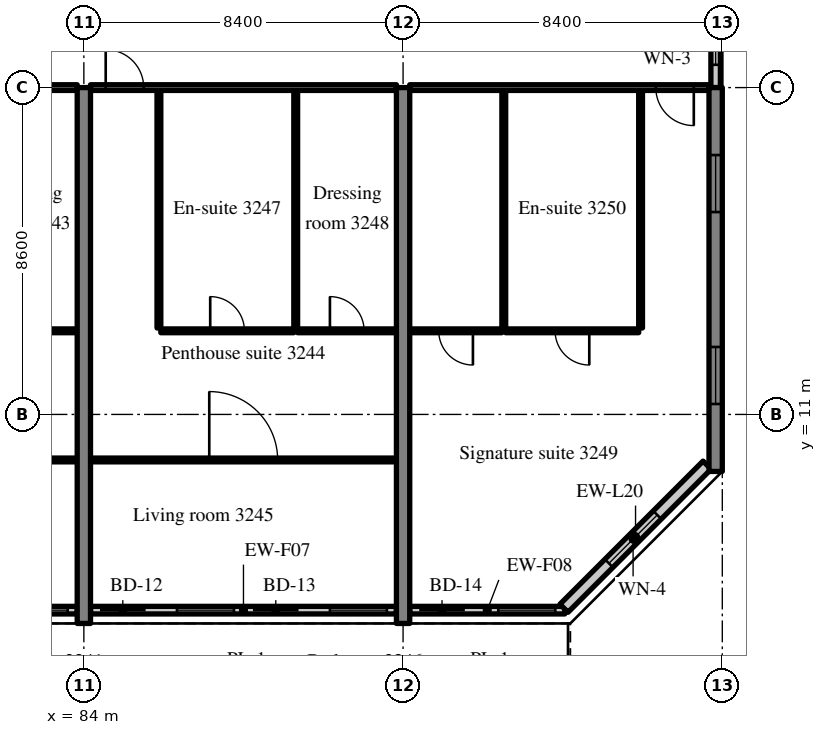
"""IFC4 building model, lengths in metres.
Left out: names, types, materials, properties, quantities, classifications, styles, units other than length and angle.
Written with IfcOpenShell. Run it as: python <this file> out.ifc"""

import sys

from ifc_helpers import new_model, si_unit, direction, frame, frame_2d, origin, place, context, subcontext, project, spatial, rectangle, extrude, source, transform, mapped, element, fill, save


model = new_model("IFC4")
c1 = context("Model", 3, precision=1e-05, world=origin(), true_north=direction((0.0, 1.0)))
c2 = subcontext(c1, "Body", "Model", "MODEL_VIEW")
j1 = project(units=[si_unit("LENGTHUNIT", "METRE"), si_unit("PLANEANGLEUNIT", "RADIAN")], contexts=[c1])
p1 = place(None, origin())
s1 = spatial("IfcSite", under=j1, at=p1, CompositionType="ELEMENT")
p2 = place(p1, origin())
s2 = spatial("IfcBuilding", under=s1, at=p2, CompositionType="ELEMENT")
p3 = place(p2, frame((0.0, 0.0, 133.2)))
s3 = spatial("IfcBuildingStorey", under=s2, at=p3, CompositionType="ELEMENT", Elevation=133.2)
m1 = source(origin(), c2, "Body", "SweptSolid", [
    extrude(rectangle(XDim=14.1, YDim=0.35, at=frame_2d((7.05, 0.0))), origin(), (0.0, 0.0, 1.0), 3.52),
])
for number, where, z_axis, x_axis in (
    (1, (84.0, 5.5, 0.0), (0.0, 0.0, 1.0), (0.0, 1.0, 0.0)),
    (2, (92.4, 5.5, 0.0), (0.0, 0.0, 1.0), (0.0, 1.0, 0.0)),
):
    element("IfcWall", number, at=place(p3, frame(where, z_axis=z_axis, x_axis=x_axis)), inside=s3, PredefinedType="SHEAR", context=c2, shape_type="MappedRepresentation", body=[
        mapped(m1, transform((0.0, 0.0, 0.0), scale=1.0)),
    ])
m2 = source(origin(), c2, "Body", "SweptSolid", [
    extrude(rectangle(XDim=10.1, YDim=0.35, at=frame_2d((5.05, 0.0))), origin(), (0.0, 0.0, 1.0), 3.52),
])
p4 = place(p3, frame((100.625, 9.5, 0.0), z_axis=(0.0, 0.0, 1.0), x_axis=(0.0, 1.0, 0.0)))
e3 = element("IfcWall", 3, at=p4, inside=s3, PredefinedType="SHEAR", context=c2, shape_type="MappedRepresentation", body=[
    mapped(m2, transform((0.0, 0.0, 0.0), scale=1.0)),
])
m3 = source(origin(), c2, "Body", "SweptSolid", [
    extrude(rectangle(XDim=1.5, YDim=1.5, at=frame_2d((0.75, 0.75))), frame((0.0, 0.185, 0.0), z_axis=(0.0, -1.0, 0.0), x_axis=(1.0, 0.0, 0.0)), (0.0, 0.0, 1.0), 0.37),
])
p5 = place(p4, frame((1.775, 0.0, 0.9)))
e4 = element("IfcOpeningElement", 4, at=p5, cuts=e3, PredefinedType="OPENING", context=c2, shape_type="MappedRepresentation", body=[
    mapped(m3, transform((0.0, 0.0, 0.0), scale=1.0)),
])
p6 = place(p4, frame((6.825, 0.0, 0.9)))
e5 = element("IfcOpeningElement", 5, at=p6, cuts=e3, PredefinedType="OPENING", context=c2, shape_type="MappedRepresentation", body=[
    mapped(m3, transform((0.0, 0.0, 0.0), scale=1.0)),
])
m4 = source(origin(), c2, "Body", "SweptSolid", [
    extrude(rectangle(XDim=8.05, YDim=0.2, at=frame_2d((4.025, 0.0))), origin(), (0.0, 0.0, 1.0), 2.82),
])
p7 = place(p3, frame((75.775, 5.85, 0.0), z_axis=(0.0, 0.0, 1.0), x_axis=(1.0, 0.0, 0.0)))
e6 = element("IfcWall", 6, at=p7, inside=s3, PredefinedType="SOLIDWALL", context=c2, shape_type="MappedRepresentation", body=[
    mapped(m4, transform((0.0, 0.0, 0.0), scale=1.0)),
])
m5 = source(origin(), c2, "Body", "SweptSolid", [
    extrude(rectangle(XDim=1.2, YDim=2.4, at=frame_2d((0.6, 1.2))), frame((0.0, 0.11, 0.0), z_axis=(0.0, -1.0, 0.0), x_axis=(1.0, 0.0, 0.0)), (0.0, 0.0, 1.0), 0.22),
])
p8 = place(p7, frame((0.25, 0.0, 0.0)))
e7 = element("IfcOpeningElement", 7, at=p8, cuts=e6, PredefinedType="OPENING", context=c2, shape_type="MappedRepresentation", body=[
    mapped(m5, transform((0.0, 0.0, 0.0), scale=1.0)),
])
m6 = source(origin(), c2, "Body", "SweptSolid", [
    extrude(rectangle(XDim=1.5, YDim=1.5, at=frame_2d((0.75, 0.75))), frame((0.0, 0.11, 0.0), z_axis=(0.0, -1.0, 0.0), x_axis=(1.0, 0.0, 0.0)), (0.0, 0.0, 1.0), 0.22),
])
p9 = place(p7, frame((2.275, 0.0, 0.9)))
e8 = element("IfcOpeningElement", 8, at=p9, cuts=e6, PredefinedType="OPENING", context=c2, shape_type="MappedRepresentation", body=[
    mapped(m6, transform((0.0, 0.0, 0.0), scale=1.0)),
])
p10 = place(p7, frame((4.275, 0.0, 0.0)))
e9 = element("IfcOpeningElement", 9, at=p10, cuts=e6, PredefinedType="OPENING", context=c2, shape_type="MappedRepresentation", body=[
    mapped(m5, transform((0.0, 0.0, 0.0), scale=1.0)),
])
p11 = place(p7, frame((6.3, 0.0, 0.9)))
e10 = element("IfcOpeningElement", 10, at=p11, cuts=e6, PredefinedType="OPENING", context=c2, shape_type="MappedRepresentation", body=[
    mapped(m6, transform((0.0, 0.0, 0.0), scale=1.0)),
])
p12 = place(p3, frame((84.175, 5.85, 0.0), z_axis=(0.0, 0.0, 1.0), x_axis=(1.0, 0.0, 0.0)))
e11 = element("IfcWall", 11, at=p12, inside=s3, PredefinedType="SOLIDWALL", context=c2, shape_type="MappedRepresentation", body=[
    mapped(m4, transform((0.0, 0.0, 0.0), scale=1.0)),
])
p13 = place(p12, frame((0.25, 0.0, 0.0)))
e12 = element("IfcOpeningElement", 12, at=p13, cuts=e11, PredefinedType="OPENING", context=c2, shape_type="MappedRepresentation", body=[
    mapped(m5, transform((0.0, 0.0, 0.0), scale=1.0)),
])
p14 = place(p12, frame((2.275, 0.0, 0.9)))
e13 = element("IfcOpeningElement", 13, at=p14, cuts=e11, PredefinedType="OPENING", context=c2, shape_type="MappedRepresentation", body=[
    mapped(m6, transform((0.0, 0.0, 0.0), scale=1.0)),
])
p15 = place(p12, frame((4.275, 0.0, 0.0)))
e14 = element("IfcOpeningElement", 14, at=p15, cuts=e11, PredefinedType="OPENING", context=c2, shape_type="MappedRepresentation", body=[
    mapped(m5, transform((0.0, 0.0, 0.0), scale=1.0)),
])
p16 = place(p12, frame((6.3, 0.0, 0.9)))
e15 = element("IfcOpeningElement", 15, at=p16, cuts=e11, PredefinedType="OPENING", context=c2, shape_type="MappedRepresentation", body=[
    mapped(m6, transform((0.0, 0.0, 0.0), scale=1.0)),
])
m7 = source(origin(), c2, "Body", "SweptSolid", [
    extrude(rectangle(XDim=4.08, YDim=0.2, at=frame_2d((2.04, 0.0))), origin(), (0.0, 0.0, 1.0), 2.82),
])
p17 = place(p3, frame((92.575, 5.85, 0.0), z_axis=(0.0, 0.0, 1.0), x_axis=(1.0, 0.0, 0.0)))
e16 = element("IfcWall", 16, at=p17, inside=s3, PredefinedType="SOLIDWALL", context=c2, shape_type="MappedRepresentation", body=[
    mapped(m7, transform((0.0, 0.0, 0.0), scale=1.0)),
])
p18 = place(p17, frame((0.25, 0.0, 0.0)))
e17 = element("IfcOpeningElement", 17, at=p18, cuts=e16, PredefinedType="OPENING", context=c2, shape_type="MappedRepresentation", body=[
    mapped(m5, transform((0.0, 0.0, 0.0), scale=1.0)),
])
p19 = place(p17, frame((2.33, 0.0, 0.9)))
e18 = element("IfcOpeningElement", 18, at=p19, cuts=e16, PredefinedType="OPENING", context=c2, shape_type="MappedRepresentation", body=[
    mapped(m6, transform((0.0, 0.0, 0.0), scale=1.0)),
])
m8 = source(origin(), c2, "Body", "SweptSolid", [
    extrude(rectangle(XDim=5.326, YDim=0.3, at=frame_2d((2.663, 0.0))), origin(), (0.0, 0.0, 1.0), 3.52),
])
p20 = place(p3, frame((96.634, 5.9, 0.0), z_axis=(0.0, 0.0, 1.0), x_axis=(0.707083859269, 0.707129702361, 0.0)))
e19 = element("IfcWall", 19, at=p20, inside=s3, PredefinedType="SOLIDWALL", context=c2, shape_type="MappedRepresentation", body=[
    mapped(m8, transform((0.0, 0.0, 0.0), scale=1.0)),
])
m9 = source(origin(), c2, "Body", "SweptSolid", [
    extrude(rectangle(XDim=1.8, YDim=1.5, at=frame_2d((0.9, 0.75))), frame((0.0, 0.16, 0.0), z_axis=(0.0, -1.0, 0.0), x_axis=(1.0, 0.0, 0.0)), (0.0, 0.0, 1.0), 0.32),
])
p21 = place(p20, frame((1.672, 0.0, 0.9)))
e20 = element("IfcOpeningElement", 20, at=p21, cuts=e19, PredefinedType="OPENING", context=c2, shape_type="MappedRepresentation", body=[
    mapped(m9, transform((0.0, 0.0, 0.0), scale=1.0)),
])
m10 = source(origin(), c2, "Body", "SweptSolid", [
    extrude(rectangle(XDim=2.4, YDim=0.25, at=frame_2d((1.2, 0.0))), origin(), (0.0, 0.0, 1.0), 2.62),
])
p22 = place(p3, frame((100.625, 19.6, 0.0), z_axis=(0.0, 0.0, 1.0), x_axis=(0.0, 1.0, 0.0)))
e21 = element("IfcWall", 21, at=p22, inside=s3, PredefinedType="SOLIDWALL", context=c2, shape_type="MappedRepresentation", body=[
    mapped(m10, transform((0.0, 0.0, 0.0), scale=1.0)),
])
m11 = source(origin(), c2, "Body", "SweptSolid", [
    extrude(rectangle(XDim=1.2, YDim=1.5, at=frame_2d((0.6, 0.75))), frame((0.0, 0.135, 0.0), z_axis=(0.0, -1.0, 0.0), x_axis=(1.0, 0.0, 0.0)), (0.0, 0.0, 1.0), 0.27),
])
p23 = place(p22, frame((0.6, 0.0, 0.9)))
e22 = element("IfcOpeningElement", 22, at=p23, cuts=e21, PredefinedType="OPENING", context=c2, shape_type="MappedRepresentation", body=[
    mapped(m11, transform((0.0, 0.0, 0.0), scale=1.0)),
])
m12 = source(origin(), c2, "Body", "SweptSolid", [
    extrude(rectangle(XDim=2.6, YDim=0.1, at=frame_2d((1.3, 0.0))), origin(), (0.0, 0.0, 1.0), 3.52),
])
p24 = place(p3, frame((81.225, 13.2, 0.0), z_axis=(0.0, 0.0, 1.0), x_axis=(1.0, 0.0, 0.0)))
e23 = element("IfcWall", 23, at=p24, inside=s3, PredefinedType="PARTITIONING", context=c2, shape_type="MappedRepresentation", body=[
    mapped(m12, transform((0.0, 0.0, 0.0), scale=1.0)),
])
m13 = source(origin(), c2, "Body", "SweptSolid", [
    extrude(rectangle(XDim=0.9, YDim=2.1, at=frame_2d((0.45, 1.05))), frame((0.0, 0.06, 0.0), z_axis=(0.0, -1.0, 0.0), x_axis=(1.0, 0.0, 0.0)), (0.0, 0.0, 1.0), 0.12),
])
p25 = place(p24, frame((0.85, 0.0, 0.0)))
e24 = element("IfcOpeningElement", 24, at=p25, cuts=e23, PredefinedType="OPENING", context=c2, shape_type="MappedRepresentation", body=[
    mapped(m13, transform((0.0, 0.0, 0.0), scale=1.0)),
])
m14 = source(origin(), c2, "Body", "SweptSolid", [
    extrude(rectangle(XDim=8.05, YDim=0.1, at=frame_2d((4.025, 0.0))), origin(), (0.0, 0.0, 1.0), 3.52),
])
p26 = place(p3, frame((75.775, 9.802, 0.0), z_axis=(0.0, 0.0, 1.0), x_axis=(1.0, 0.0, 0.0)))
e25 = element("IfcWall", 25, at=p26, inside=s3, PredefinedType="PARTITIONING", context=c2, shape_type="MappedRepresentation", body=[
    mapped(m14, transform((0.0, 0.0, 0.0), scale=1.0)),
])
m15 = source(origin(), c2, "Body", "SweptSolid", [
    extrude(rectangle(XDim=1.8, YDim=2.1, at=frame_2d((0.9, 1.05))), frame((0.0, 0.06, 0.0), z_axis=(0.0, -1.0, 0.0), x_axis=(1.0, 0.0, 0.0)), (0.0, 0.0, 1.0), 0.12),
])
p27 = place(p26, frame((3.125, 0.0, 0.0)))
e26 = element("IfcOpeningElement", 26, at=p27, cuts=e25, PredefinedType="OPENING", context=c2, shape_type="MappedRepresentation", body=[
    mapped(m15, transform((0.0, 0.0, 0.0), scale=1.0)),
])
m16 = source(origin(), c2, "Body", "SweptSolid", [
    extrude(rectangle(XDim=8.05, YDim=0.15, at=frame_2d((4.025, 0.0))), origin(), (0.0, 0.0, 1.0), 2.82),
])
p28 = place(p3, frame((75.775, 19.6, 0.0), z_axis=(0.0, 0.0, 1.0), x_axis=(1.0, 0.0, 0.0)))
e27 = element("IfcWall", 27, at=p28, inside=s3, PredefinedType="PARTITIONING", context=c2, shape_type="MappedRepresentation", body=[
    mapped(m16, transform((0.0, 0.0, 0.0), scale=1.0)),
])
m17 = source(origin(), c2, "Body", "SweptSolid", [
    extrude(rectangle(XDim=1.0, YDim=2.1, at=frame_2d((0.5, 1.05))), frame((0.0, 0.085, 0.0), z_axis=(0.0, -1.0, 0.0), x_axis=(1.0, 0.0, 0.0)), (0.0, 0.0, 1.0), 0.17),
])
p29 = place(p28, frame((0.4, 0.0, 0.0)))
e28 = element("IfcOpeningElement", 28, at=p29, cuts=e27, PredefinedType="OPENING", context=c2, shape_type="MappedRepresentation", body=[
    mapped(m17, transform((0.0, 0.0, 0.0), scale=1.0)),
])
m18 = source(origin(), c2, "Body", "SweptSolid", [
    extrude(rectangle(XDim=6.25, YDim=0.1, at=frame_2d((3.125, 0.0))), origin(), (0.0, 0.0, 1.0), 3.52),
])
for number, where, z_axis, x_axis in (
    (29, (85.975, 13.275, 0.0), (0.0, 0.0, 1.0), (0.0, 1.0, 0.0)),
    (30, (89.575, 13.275, 0.0), (0.0, 0.0, 1.0), (0.0, 1.0, 0.0)),
):
    element("IfcWall", number, at=place(p3, frame(where, z_axis=z_axis, x_axis=x_axis)), inside=s3, PredefinedType="PARTITIONING", context=c2, shape_type="MappedRepresentation", body=[
        mapped(m18, transform((0.0, 0.0, 0.0), scale=1.0)),
    ])
m19 = source(origin(), c2, "Body", "SweptSolid", [
    extrude(rectangle(XDim=3.5, YDim=0.1, at=frame_2d((1.75, 0.0))), origin(), (0.0, 0.0, 1.0), 3.52),
])
p30 = place(p3, frame((86.025, 13.2, 0.0), z_axis=(0.0, 0.0, 1.0), x_axis=(1.0, 0.0, 0.0)))
e31 = element("IfcWall", 31, at=p30, inside=s3, PredefinedType="PARTITIONING", context=c2, shape_type="MappedRepresentation", body=[
    mapped(m19, transform((0.0, 0.0, 0.0), scale=1.0)),
])
p31 = place(p30, frame((1.3, 0.0, 0.0)))
e32 = element("IfcOpeningElement", 32, at=p31, cuts=e31, PredefinedType="OPENING", context=c2, shape_type="MappedRepresentation", body=[
    mapped(m13, transform((0.0, 0.0, 0.0), scale=1.0)),
])
m20 = source(origin(), c2, "Body", "SweptSolid", [
    extrude(rectangle(XDim=2.6, YDim=0.1, at=frame_2d((1.3, 0.0))), origin(), (0.0, 0.0, 1.0), 3.52),
])
p32 = place(p3, frame((89.625, 13.2, 0.0), z_axis=(0.0, 0.0, 1.0), x_axis=(1.0, 0.0, 0.0)))
e33 = element("IfcWall", 33, at=p32, inside=s3, PredefinedType="PARTITIONING", context=c2, shape_type="MappedRepresentation", body=[
    mapped(m20, transform((0.0, 0.0, 0.0), scale=1.0)),
])
p33 = place(p32, frame((0.85, 0.0, 0.0)))
e34 = element("IfcOpeningElement", 34, at=p33, cuts=e33, PredefinedType="OPENING", context=c2, shape_type="MappedRepresentation", body=[
    mapped(m13, transform((0.0, 0.0, 0.0), scale=1.0)),
])
p34 = place(p3, frame((84.175, 9.802, 0.0), z_axis=(0.0, 0.0, 1.0), x_axis=(1.0, 0.0, 0.0)))
e35 = element("IfcWall", 35, at=p34, inside=s3, PredefinedType="PARTITIONING", context=c2, shape_type="MappedRepresentation", body=[
    mapped(m14, transform((0.0, 0.0, 0.0), scale=1.0)),
])
p35 = place(p34, frame((3.125, 0.0, 0.0)))
e36 = element("IfcOpeningElement", 36, at=p35, cuts=e35, PredefinedType="OPENING", context=c2, shape_type="MappedRepresentation", body=[
    mapped(m15, transform((0.0, 0.0, 0.0), scale=1.0)),
])
p36 = place(p3, frame((84.175, 19.6, 0.0), z_axis=(0.0, 0.0, 1.0), x_axis=(1.0, 0.0, 0.0)))
e37 = element("IfcWall", 37, at=p36, inside=s3, PredefinedType="PARTITIONING", context=c2, shape_type="MappedRepresentation", body=[
    mapped(m16, transform((0.0, 0.0, 0.0), scale=1.0)),
])
p37 = place(p36, frame((0.4, 0.0, 0.0)))
e38 = element("IfcOpeningElement", 38, at=p37, cuts=e37, PredefinedType="OPENING", context=c2, shape_type="MappedRepresentation", body=[
    mapped(m17, transform((0.0, 0.0, 0.0), scale=1.0)),
])
for number, where, z_axis, x_axis in (
    (39, (98.65, 13.275, 0.0), (0.0, 0.0, 1.0), (0.0, 1.0, 0.0)),
    (40, (95.05, 13.275, 0.0), (0.0, 0.0, 1.0), (0.0, 1.0, 0.0)),
):
    element("IfcWall", number, at=place(p3, frame(where, z_axis=z_axis, x_axis=x_axis)), inside=s3, PredefinedType="PARTITIONING", context=c2, shape_type="MappedRepresentation", body=[
        mapped(m18, transform((0.0, 0.0, 0.0), scale=1.0)),
    ])
p38 = place(p3, frame((95.1, 13.2, 0.0), z_axis=(0.0, 0.0, 1.0), x_axis=(1.0, 0.0, 0.0)))
e41 = element("IfcWall", 41, at=p38, inside=s3, PredefinedType="PARTITIONING", context=c2, shape_type="MappedRepresentation", body=[
    mapped(m19, transform((0.0, 0.0, 0.0), scale=1.0)),
])
p39 = place(p38, frame((1.3, 0.0, 0.0)))
e42 = element("IfcOpeningElement", 42, at=p39, cuts=e41, PredefinedType="OPENING", context=c2, shape_type="MappedRepresentation", body=[
    mapped(m13, transform((0.0, 0.0, 0.0), scale=1.0)),
])
m21 = source(origin(), c2, "Body", "SweptSolid", [
    extrude(rectangle(XDim=2.425, YDim=0.1, at=frame_2d((1.212, 0.0))), origin(), (0.0, 0.0, 1.0), 3.52),
])
p40 = place(p3, frame((92.575, 13.2, 0.0), z_axis=(0.0, 0.0, 1.0), x_axis=(1.0, 0.0, 0.0)))
e43 = element("IfcWall", 43, at=p40, inside=s3, PredefinedType="PARTITIONING", context=c2, shape_type="MappedRepresentation", body=[
    mapped(m21, transform((0.0, 0.0, 0.0), scale=1.0)),
])
p41 = place(p40, frame((0.763, 0.0, 0.0)))
e44 = element("IfcOpeningElement", 44, at=p41, cuts=e43, PredefinedType="OPENING", context=c2, shape_type="MappedRepresentation", body=[
    mapped(m13, transform((0.0, 0.0, 0.0), scale=1.0)),
])
m22 = source(origin(), c2, "Body", "SweptSolid", [
    extrude(rectangle(XDim=7.875, YDim=0.15, at=frame_2d((3.938, 0.0))), origin(), (0.0, 0.0, 1.0), 2.82),
])
p42 = place(p3, frame((92.575, 19.6, 0.0), z_axis=(0.0, 0.0, 1.0), x_axis=(1.0, 0.0, 0.0)))
e45 = element("IfcWall", 45, at=p42, inside=s3, PredefinedType="PARTITIONING", context=c2, shape_type="MappedRepresentation", body=[
    mapped(m22, transform((0.0, 0.0, 0.0), scale=1.0)),
])
p43 = place(p42, frame((6.475, 0.0, 0.0)))
e46 = element("IfcOpeningElement", 46, at=p43, cuts=e45, PredefinedType="OPENING", context=c2, shape_type="MappedRepresentation", body=[
    mapped(m17, transform((0.0, 0.0, 0.0), scale=1.0)),
])
m23 = source(origin(), c2, "Body", "SweptSolid", [
    extrude(rectangle(XDim=1.5, YDim=1.5, at=frame_2d((0.75, 0.75))), frame((0.0, 0.03, 0.0), z_axis=(0.0, -1.0, 0.0), x_axis=(1.0, 0.0, 0.0)), (0.0, 0.0, 1.0), 0.06),
])
p44 = place(p11, origin())
e47 = element("IfcWindow", 47, at=p44, inside=s3, PartitioningType="SINGLE_PANEL", PredefinedType="WINDOW", context=c2, shape_type="MappedRepresentation", body=[
    mapped(m23, transform((0.0, 0.0, 0.0), scale=1.0)),
])
fill(e10, e47)
m24 = source(origin(), c2, "Body", "SweptSolid", [
    extrude(rectangle(XDim=1.2, YDim=2.4, at=frame_2d((0.6, 1.2))), frame((0.0, 0.025, 0.0), z_axis=(0.0, -1.0, 0.0), x_axis=(1.0, 0.0, 0.0)), (0.0, 0.0, 1.0), 0.05),
])
p45 = place(p13, origin())
e48 = element("IfcDoor", 48, at=p45, inside=s3, OperationType="SLIDING_TO_RIGHT", PredefinedType="DOOR", context=c2, shape_type="MappedRepresentation", body=[
    mapped(m24, transform((0.0, 0.0, 0.0), scale=1.0)),
])
fill(e12, e48)
p46 = place(p14, origin())
e49 = element("IfcWindow", 49, at=p46, inside=s3, PartitioningType="SINGLE_PANEL", PredefinedType="WINDOW", context=c2, shape_type="MappedRepresentation", body=[
    mapped(m23, transform((0.0, 0.0, 0.0), scale=1.0)),
])
fill(e13, e49)
p47 = place(p15, origin())
e50 = element("IfcDoor", 50, at=p47, inside=s3, OperationType="SLIDING_TO_LEFT", PredefinedType="DOOR", context=c2, shape_type="MappedRepresentation", body=[
    mapped(m24, transform((0.0, 0.0, 0.0), scale=1.0)),
])
fill(e14, e50)
p48 = place(p16, origin())
e51 = element("IfcWindow", 51, at=p48, inside=s3, PartitioningType="SINGLE_PANEL", PredefinedType="WINDOW", context=c2, shape_type="MappedRepresentation", body=[
    mapped(m23, transform((0.0, 0.0, 0.0), scale=1.0)),
])
fill(e15, e51)
p49 = place(p18, origin())
e52 = element("IfcDoor", 52, at=p49, inside=s3, OperationType="SLIDING_TO_RIGHT", PredefinedType="DOOR", context=c2, shape_type="MappedRepresentation", body=[
    mapped(m24, transform((0.0, 0.0, 0.0), scale=1.0)),
])
fill(e17, e52)
p50 = place(p19, origin())
e53 = element("IfcWindow", 53, at=p50, inside=s3, PartitioningType="SINGLE_PANEL", PredefinedType="WINDOW", context=c2, shape_type="MappedRepresentation", body=[
    mapped(m23, transform((0.0, 0.0, 0.0), scale=1.0)),
])
fill(e18, e53)
m25 = source(origin(), c2, "Body", "SweptSolid", [
    extrude(rectangle(XDim=1.8, YDim=1.5, at=frame_2d((0.9, 0.75))), frame((0.0, 0.03, 0.0), z_axis=(0.0, -1.0, 0.0), x_axis=(1.0, 0.0, 0.0)), (0.0, 0.0, 1.0), 0.06),
])
p51 = place(p21, origin())
e54 = element("IfcWindow", 54, at=p51, inside=s3, PartitioningType="SINGLE_PANEL", PredefinedType="WINDOW", context=c2, shape_type="MappedRepresentation", body=[
    mapped(m25, transform((0.0, 0.0, 0.0), scale=1.0)),
])
fill(e20, e54)
p52 = place(p5, origin())
e55 = element("IfcWindow", 55, at=p52, inside=s3, PartitioningType="SINGLE_PANEL", PredefinedType="WINDOW", context=c2, shape_type="MappedRepresentation", body=[
    mapped(m23, transform((0.0, 0.0, 0.0), scale=1.0)),
])
fill(e4, e55)
p53 = place(p6, origin())
e56 = element("IfcWindow", 56, at=p53, inside=s3, PartitioningType="SINGLE_PANEL", PredefinedType="WINDOW", context=c2, shape_type="MappedRepresentation", body=[
    mapped(m23, transform((0.0, 0.0, 0.0), scale=1.0)),
])
fill(e5, e56)
m26 = source(origin(), c2, "Body", "SweptSolid", [
    extrude(rectangle(XDim=1.2, YDim=1.5, at=frame_2d((0.6, 0.75))), frame((0.0, 0.03, 0.0), z_axis=(0.0, -1.0, 0.0), x_axis=(1.0, 0.0, 0.0)), (0.0, 0.0, 1.0), 0.06),
])
p54 = place(p23, origin())
e57 = element("IfcWindow", 57, at=p54, inside=s3, PartitioningType="SINGLE_PANEL", PredefinedType="WINDOW", context=c2, shape_type="MappedRepresentation", body=[
    mapped(m26, transform((0.0, 0.0, 0.0), scale=1.0)),
])
fill(e22, e57)
m27 = source(origin(), c2, "Body", "SweptSolid", [
    extrude(rectangle(XDim=0.9, YDim=2.1, at=frame_2d((0.45, 1.05))), frame((0.0, 0.025, 0.0), z_axis=(0.0, -1.0, 0.0), x_axis=(1.0, 0.0, 0.0)), (0.0, 0.0, 1.0), 0.05),
])
p55 = place(p31, origin())
e58 = element("IfcDoor", 58, at=p55, inside=s3, OperationType="SINGLE_SWING_LEFT", PredefinedType="DOOR", context=c2, shape_type="MappedRepresentation", body=[
    mapped(m27, transform((0.0, 0.0, 0.0), scale=1.0)),
])
fill(e32, e58)
p56 = place(p33, origin())
e59 = element("IfcDoor", 59, at=p56, inside=s3, OperationType="SINGLE_SWING_LEFT", PredefinedType="DOOR", context=c2, shape_type="MappedRepresentation", body=[
    mapped(m27, transform((0.0, 0.0, 0.0), scale=1.0)),
])
fill(e34, e59)
m28 = source(origin(), c2, "Body", "SweptSolid", [
    extrude(rectangle(XDim=1.8, YDim=2.1, at=frame_2d((0.9, 1.05))), frame((0.0, 0.025, 0.0), z_axis=(0.0, -1.0, 0.0), x_axis=(1.0, 0.0, 0.0)), (0.0, 0.0, 1.0), 0.05),
])
p57 = place(p35, origin())
e60 = element("IfcDoor", 60, at=p57, inside=s3, OperationType="DOUBLE_DOOR_SINGLE_SWING", PredefinedType="DOOR", context=c2, shape_type="MappedRepresentation", body=[
    mapped(m28, transform((0.0, 0.0, 0.0), scale=1.0)),
])
fill(e36, e60)
m29 = source(origin(), c2, "Body", "SweptSolid", [
    extrude(rectangle(XDim=1.0, YDim=2.1, at=frame_2d((0.5, 1.05))), frame((0.0, 0.025, 0.0), z_axis=(0.0, -1.0, 0.0), x_axis=(1.0, 0.0, 0.0)), (0.0, 0.0, 1.0), 0.05),
])
p58 = place(p37, origin())
e61 = element("IfcDoor", 61, at=p58, inside=s3, OperationType="SINGLE_SWING_LEFT", PredefinedType="DOOR", context=c2, shape_type="MappedRepresentation", body=[
    mapped(m29, transform((0.0, 0.0, 0.0), scale=1.0)),
])
fill(e38, e61)
p59 = place(p39, origin())
e62 = element("IfcDoor", 62, at=p59, inside=s3, OperationType="SINGLE_SWING_RIGHT", PredefinedType="DOOR", context=c2, shape_type="MappedRepresentation", body=[
    mapped(m27, transform((0.0, 0.0, 0.0), scale=1.0)),
])
fill(e42, e62)
p60 = place(p41, origin())
e63 = element("IfcDoor", 63, at=p60, inside=s3, OperationType="SINGLE_SWING_RIGHT", PredefinedType="DOOR", context=c2, shape_type="MappedRepresentation", body=[
    mapped(m27, transform((0.0, 0.0, 0.0), scale=1.0)),
])
fill(e44, e63)
p61 = place(p43, origin())
e64 = element("IfcDoor", 64, at=p61, inside=s3, OperationType="SINGLE_SWING_RIGHT", PredefinedType="DOOR", context=c2, shape_type="MappedRepresentation", body=[
    mapped(m29, transform((0.0, 0.0, 0.0), scale=1.0)),
])
fill(e46, e64)
save(model, sys.argv[1])
